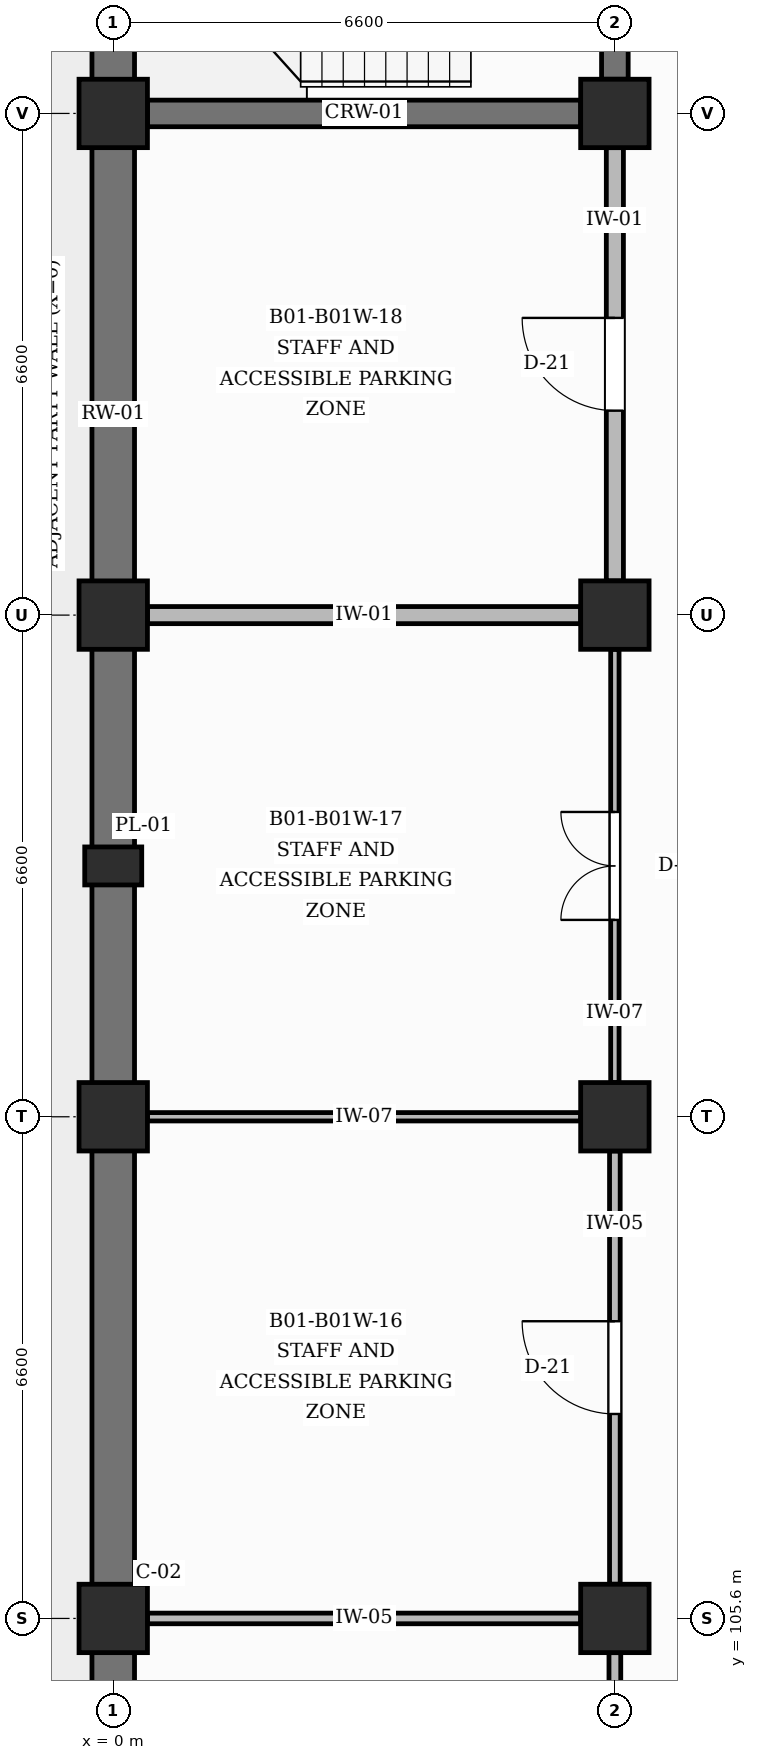
"""IFC4 building model, lengths in metres.
Left out: names, types, materials, properties, quantities, classifications, styles, units other than length and angle.
Written with IfcOpenShell. Run it as: python <this file> out.ifc"""

import sys

from ifc_helpers import new_model, si_unit, direction, frame, frame_2d, origin, origin_2d, place, context, subcontext, project, spatial, rectangle, extrude, element, fill, save


model = new_model("IFC4")
c1 = context("Model", 3, precision=1e-05, world=origin(), true_north=direction((0.0, 1.0)))
c2 = subcontext(c1, "Body", "Model", "MODEL_VIEW")
j1 = project(units=[si_unit("LENGTHUNIT", "METRE"), si_unit("PLANEANGLEUNIT", "RADIAN")], contexts=[c1])
p1 = place(None, origin())
s1 = spatial("IfcSite", under=j1, at=p1, CompositionType="ELEMENT")
p2 = place(p1, origin())
s2 = spatial("IfcBuilding", under=s1, at=p2, CompositionType="ELEMENT")
p3 = place(p2, frame((0.0, 0.0, -4.5)))
s3 = spatial("IfcBuildingStorey", under=s2, at=p3, CompositionType="ELEMENT", Elevation=-4.5)
p4 = place(p3, frame((0.0, 115.5, 0.0), z_axis=(0.0, 0.0, 1.0), x_axis=(0.0, 1.0, 0.0)))
e1 = element("IfcColumn", 1, at=p4, inside=s3, PredefinedType="PILASTER", context=c2, shape_type="SweptSolid", body=[
    extrude(rectangle(XDim=0.5, YDim=0.75, at=origin_2d()), origin(), (0.0, 0.0, 1.0), 4.5),
])
for number, where, z_axis, x_axis in (
    (2, (0.0, 105.6, 0.0), (0.0, 0.0, 1.0), (1.0, 0.0, 0.0)),
    (3, (0.0, 112.2, 0.0), (0.0, 0.0, 1.0), (1.0, 0.0, 0.0)),
    (4, (0.0, 118.8, 0.0), (0.0, 0.0, 1.0), (1.0, 0.0, 0.0)),
    (5, (0.0, 125.4, 0.0), (0.0, 0.0, 1.0), (1.0, 0.0, 0.0)),
    (6, (6.6, 105.6, 0.0), (0.0, 0.0, 1.0), (1.0, 0.0, 0.0)),
    (7, (6.6, 112.2, 0.0), (0.0, 0.0, 1.0), (1.0, 0.0, 0.0)),
    (8, (6.6, 118.8, 0.0), (0.0, 0.0, 1.0), (1.0, 0.0, 0.0)),
    (9, (6.6, 125.4, 0.0), (0.0, 0.0, 1.0), (1.0, 0.0, 0.0)),
):
    element("IfcColumn", number, at=place(p3, frame(where, z_axis=z_axis, x_axis=x_axis)), inside=s3, PredefinedType="COLUMN", context=c2, shape_type="SweptSolid", body=[
        extrude(rectangle(XDim=0.9, YDim=0.9, at=origin_2d()), origin(), (0.0, 0.0, 1.0), 4.5),
    ])
for number, where, z_axis, x_axis in (
    (10, (0.0, 99.45, 0.0), (0.0, 0.0, 1.0), (0.0, 1.0, 0.0)),
    (11, (0.0, 106.05, 0.0), (0.0, 0.0, 1.0), (0.0, 1.0, 0.0)),
):
    element("IfcWall", number, at=place(p3, frame(where, z_axis=z_axis, x_axis=x_axis)), inside=s3, PredefinedType="USERDEFINED", context=c2, shape_type="SweptSolid", body=[
        extrude(rectangle(XDim=5.7, YDim=0.56, at=frame_2d((2.85, 0.0))), origin(), (0.0, 0.0, 1.0), 3.49),
    ])
p5 = place(p3, frame((0.0, 112.65, 0.0), z_axis=(0.0, 0.0, 1.0), x_axis=(0.0, 1.0, 0.0)))
e12 = element("IfcWall", 12, at=p5, inside=s3, PredefinedType="USERDEFINED", context=c2, shape_type="SweptSolid", body=[
    extrude(rectangle(XDim=5.7, YDim=0.56, at=frame_2d((2.85, 0.0))), origin(), (0.0, 0.0, 1.0), 3.49),
])
for number, where, z_axis, x_axis in (
    (13, (0.0, 119.25, 0.0), (0.0, 0.0, 1.0), (0.0, 1.0, 0.0)),
    (14, (0.0, 125.85, 0.0), (0.0, 0.0, 1.0), (0.0, 1.0, 0.0)),
):
    element("IfcWall", number, at=place(p3, frame(where, z_axis=z_axis, x_axis=x_axis)), inside=s3, PredefinedType="USERDEFINED", context=c2, shape_type="SweptSolid", body=[
        extrude(rectangle(XDim=5.7, YDim=0.56, at=frame_2d((2.85, 0.0))), origin(), (0.0, 0.0, 1.0), 3.49),
    ])
p6 = place(p3, frame((0.45, 125.4, 0.0), z_axis=(0.0, 0.0, 1.0), x_axis=(1.0, 0.0, 0.0)))
e15 = element("IfcWall", 15, at=p6, inside=s3, PredefinedType="SHEAR", context=c2, shape_type="SweptSolid", body=[
    extrude(rectangle(XDim=5.7, YDim=0.35, at=frame_2d((2.85, 0.0))), origin(), (0.0, 0.0, 1.0), 3.34),
])
p7 = place(p3, frame((6.6, 125.85, 0.0), z_axis=(0.0, 0.0, 1.0), x_axis=(0.0, 1.0, 0.0)))
e16 = element("IfcWall", 16, at=p7, inside=s3, PredefinedType="SHEAR", context=c2, shape_type="SweptSolid", body=[
    extrude(rectangle(XDim=5.7, YDim=0.35, at=frame_2d((2.85, 0.0))), origin(), (0.0, 0.0, 1.0), 3.34),
])
p8 = place(p7, frame((2.3, 0.0, 0.0)))
e17 = element("IfcOpeningElement", 17, at=p8, cuts=e16, PredefinedType="OPENING", context=c2, shape_type="SweptSolid", body=[
    extrude(rectangle(XDim=1.1, YDim=2.15, at=frame_2d((0.55, 1.075))), frame((0.0, 0.185, 0.0), z_axis=(0.0, -1.0, 0.0), x_axis=(1.0, 0.0, 0.0)), (0.0, 0.0, 1.0), 0.37),
])
p9 = place(p3, frame((6.6, 99.45, 0.0), z_axis=(0.0, 0.0, 1.0), x_axis=(0.0, 1.0, 0.0)))
e18 = element("IfcWall", 18, at=p9, inside=s3, PredefinedType="PARTITIONING", context=c2, shape_type="SweptSolid", body=[
    extrude(rectangle(XDim=5.7, YDim=0.155, at=frame_2d((2.85, 0.0))), origin(), (0.0, 0.0, 1.0), 3.34),
])
p10 = place(p9, frame((2.14, 0.0, 0.0)))
e19 = element("IfcOpeningElement", 19, at=p10, cuts=e18, PredefinedType="OPENING", context=c2, shape_type="SweptSolid", body=[
    extrude(rectangle(XDim=1.42, YDim=2.2, at=frame_2d((0.71, 1.1))), frame((0.0, 0.087, 0.0), z_axis=(0.0, -1.0, 0.0), x_axis=(1.0, 0.0, 0.0)), (0.0, 0.0, 1.0), 0.175),
])
p11 = place(p3, frame((0.45, 105.6, 0.0), z_axis=(0.0, 0.0, 1.0), x_axis=(1.0, 0.0, 0.0)))
e20 = element("IfcWall", 20, at=p11, inside=s3, PredefinedType="PARTITIONING", context=c2, shape_type="SweptSolid", body=[
    extrude(rectangle(XDim=5.7, YDim=0.14, at=frame_2d((2.85, 0.0))), origin(), (0.0, 0.0, 1.0), 3.24),
])
p12 = place(p3, frame((6.6, 106.05, 0.0), z_axis=(0.0, 0.0, 1.0), x_axis=(0.0, 1.0, 0.0)))
e21 = element("IfcWall", 21, at=p12, inside=s3, PredefinedType="PARTITIONING", context=c2, shape_type="SweptSolid", body=[
    extrude(rectangle(XDim=5.7, YDim=0.14, at=frame_2d((2.85, 0.0))), origin(), (0.0, 0.0, 1.0), 3.34),
])
p13 = place(p12, frame((2.24, 0.0, 0.0)))
e22 = element("IfcOpeningElement", 22, at=p13, cuts=e21, PredefinedType="OPENING", context=c2, shape_type="SweptSolid", body=[
    extrude(rectangle(XDim=1.22, YDim=2.15, at=frame_2d((0.61, 1.075))), frame((0.0, 0.08, 0.0), z_axis=(0.0, -1.0, 0.0), x_axis=(1.0, 0.0, 0.0)), (0.0, 0.0, 1.0), 0.16),
])
p14 = place(p3, frame((0.45, 112.2, 0.0), z_axis=(0.0, 0.0, 1.0), x_axis=(1.0, 0.0, 0.0)))
e23 = element("IfcWall", 23, at=p14, inside=s3, PredefinedType="PARTITIONING", context=c2, shape_type="SweptSolid", body=[
    extrude(rectangle(XDim=5.7, YDim=0.11, at=frame_2d((2.85, 0.0))), origin(), (0.0, 0.0, 1.0), 3.34),
])
p15 = place(p3, frame((6.6, 112.65, 0.0), z_axis=(0.0, 0.0, 1.0), x_axis=(0.0, 1.0, 0.0)))
e24 = element("IfcWall", 24, at=p15, inside=s3, PredefinedType="PARTITIONING", context=c2, shape_type="SweptSolid", body=[
    extrude(rectangle(XDim=5.7, YDim=0.11, at=frame_2d((2.85, 0.0))), origin(), (0.0, 0.0, 1.0), 3.34),
])
p16 = place(p15, frame((2.14, 0.0, 0.0)))
e25 = element("IfcOpeningElement", 25, at=p16, cuts=e24, PredefinedType="OPENING", context=c2, shape_type="SweptSolid", body=[
    extrude(rectangle(XDim=1.42, YDim=2.2, at=frame_2d((0.71, 1.1))), frame((0.0, 0.065, 0.0), z_axis=(0.0, -1.0, 0.0), x_axis=(1.0, 0.0, 0.0)), (0.0, 0.0, 1.0), 0.13),
])
p17 = place(p3, frame((0.45, 118.8, 0.0), z_axis=(0.0, 0.0, 1.0), x_axis=(1.0, 0.0, 0.0)))
e26 = element("IfcWall", 26, at=p17, inside=s3, PredefinedType="PARTITIONING", context=c2, shape_type="SweptSolid", body=[
    extrude(rectangle(XDim=5.7, YDim=0.225, at=frame_2d((2.85, 0.0))), origin(), (0.0, 0.0, 1.0), 3.24),
])
p18 = place(p3, frame((6.6, 119.25, 0.0), z_axis=(0.0, 0.0, 1.0), x_axis=(0.0, 1.0, 0.0)))
e27 = element("IfcWall", 27, at=p18, inside=s3, PredefinedType="PARTITIONING", context=c2, shape_type="SweptSolid", body=[
    extrude(rectangle(XDim=5.7, YDim=0.225, at=frame_2d((2.85, 0.0))), origin(), (0.0, 0.0, 1.0), 3.34),
])
p19 = place(p18, frame((2.24, 0.0, 0.0)))
e28 = element("IfcOpeningElement", 28, at=p19, cuts=e27, PredefinedType="OPENING", context=c2, shape_type="SweptSolid", body=[
    extrude(rectangle(XDim=1.22, YDim=2.15, at=frame_2d((0.61, 1.075))), frame((0.0, 0.123, 0.0), z_axis=(0.0, -1.0, 0.0), x_axis=(1.0, 0.0, 0.0)), (0.0, 0.0, 1.0), 0.245),
])
p20 = place(p13, origin())
e29 = element("IfcDoor", 29, at=p20, inside=s3, OperationType="SINGLE_SWING_RIGHT", PredefinedType="DOOR", context=c2, shape_type="SweptSolid", body=[
    extrude(rectangle(XDim=1.22, YDim=2.15, at=frame_2d((0.61, 1.075))), frame((0.0, 0.025, 0.0), z_axis=(0.0, -1.0, 0.0), x_axis=(1.0, 0.0, 0.0)), (0.0, 0.0, 1.0), 0.05),
])
fill(e22, e29)
p21 = place(p16, origin())
e30 = element("IfcDoor", 30, at=p21, inside=s3, OperationType="DOUBLE_DOOR_SINGLE_SWING", PredefinedType="DOOR", context=c2, shape_type="SweptSolid", body=[
    extrude(rectangle(XDim=1.42, YDim=2.2, at=frame_2d((0.71, 1.1))), frame((0.0, 0.025, 0.0), z_axis=(0.0, -1.0, 0.0), x_axis=(1.0, 0.0, 0.0)), (0.0, 0.0, 1.0), 0.05),
])
fill(e25, e30)
p22 = place(p19, origin())
e31 = element("IfcDoor", 31, at=p22, inside=s3, OperationType="SINGLE_SWING_RIGHT", PredefinedType="DOOR", context=c2, shape_type="SweptSolid", body=[
    extrude(rectangle(XDim=1.22, YDim=2.15, at=frame_2d((0.61, 1.075))), frame((0.0, 0.025, 0.0), z_axis=(0.0, -1.0, 0.0), x_axis=(1.0, 0.0, 0.0)), (0.0, 0.0, 1.0), 0.05),
])
fill(e28, e31)
save(model, sys.argv[1])
